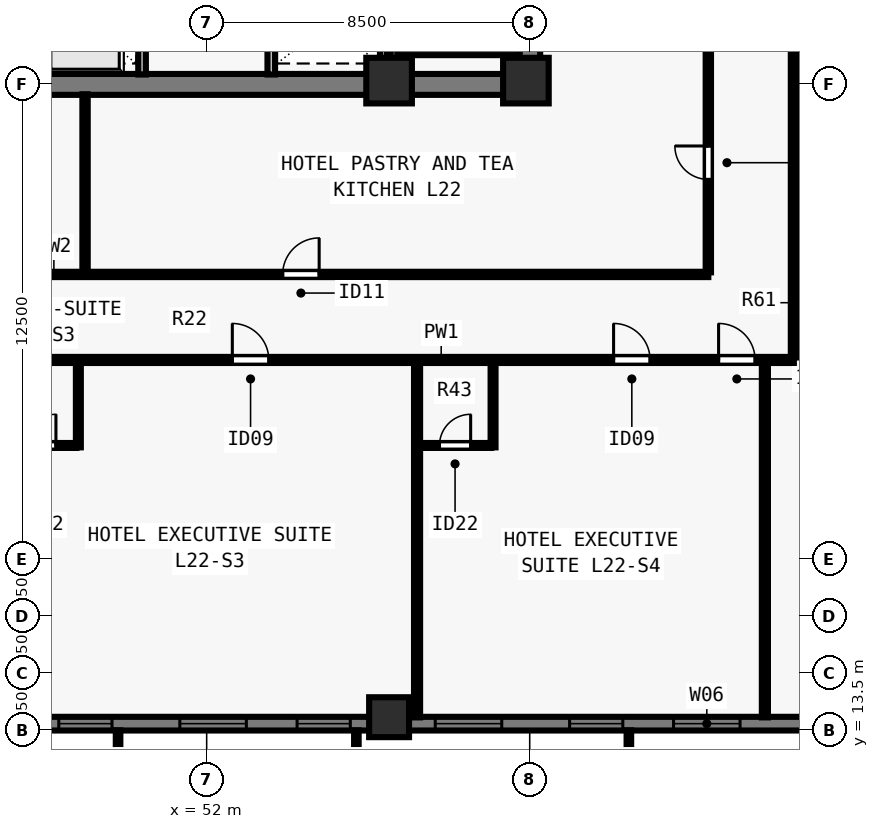
"""IFC4 building model, lengths in metres.
Left out: names, types, materials, properties, quantities, classifications, styles, units other than length and angle.
Written with IfcOpenShell. Run it as: python <this file> out.ifc"""

import sys

from ifc_helpers import new_model, si_unit, direction, frame, frame_2d, origin, origin_2d, place, context, subcontext, project, spatial, rectangle, extrude, element, fill, save


model = new_model("IFC4")
c1 = context("Model", 3, precision=1e-05, world=origin(), true_north=direction((0.0, 1.0)))
c2 = subcontext(c1, "Body", "Model", "MODEL_VIEW")
j1 = project(units=[si_unit("LENGTHUNIT", "METRE"), si_unit("PLANEANGLEUNIT", "RADIAN")], contexts=[c1])
p1 = place(None, origin())
s1 = spatial("IfcSite", under=j1, at=p1, CompositionType="ELEMENT")
p2 = place(p1, origin())
s2 = spatial("IfcBuilding", under=s1, at=p2, CompositionType="ELEMENT")
p3 = place(p2, frame((0.0, 0.0, 83.0)))
s3 = spatial("IfcBuildingStorey", under=s2, at=p3, CompositionType="ELEMENT", Elevation=83.0)
for number, where, z_axis, x_axis in (
    (1, (56.8, 30.6, 0.0), (0.0, 0.0, 1.0), (1.0, 0.0, 0.0)),
    (2, (60.4, 30.6, 0.0), (0.0, 0.0, 1.0), (1.0, 0.0, 0.0)),
):
    element("IfcColumn", number, at=place(p3, frame(where, z_axis=z_axis, x_axis=x_axis)), inside=s3, PredefinedType="COLUMN", context=c2, shape_type="SweptSolid", body=[
        extrude(rectangle(XDim=1.2, YDim=1.2, at=origin_2d()), origin(), (0.0, 0.0, 1.0), 3.5),
    ])
p4 = place(p3, frame((56.8, 13.85, 0.0), z_axis=(0.0, 0.0, 1.0), x_axis=(1.0, 0.0, 0.0)))
e3 = element("IfcColumn", 3, at=p4, inside=s3, PredefinedType="COLUMN", context=c2, shape_type="SweptSolid", body=[
    extrude(rectangle(XDim=1.05, YDim=1.05, at=origin_2d()), origin(), (0.0, 0.0, 1.0), 3.5),
])
p5 = place(p3, frame((74.5, 13.68, 0.0), z_axis=(0.0, 0.0, 1.0), x_axis=(-1.0, 0.0, 0.0)))
e4 = element("IfcWall", 4, at=p5, inside=s3, PredefinedType="SOLIDWALL", context=c2, shape_type="SweptSolid", body=[
    extrude(rectangle(XDim=44.662, YDim=0.36, at=frame_2d((22.331, 0.0))), origin(), (0.0, 0.0, 1.0), 3.28),
])
p6 = place(p5, frame((4.83, 0.0, 0.8)))
e5 = element("IfcOpeningElement", 5, at=p6, cuts=e4, PredefinedType="OPENING", context=c2, shape_type="SweptSolid", body=[
    extrude(rectangle(XDim=1.4, YDim=1.544, at=frame_2d((0.7, 0.772))), frame((0.0, 0.19, 0.0), z_axis=(0.0, -1.0, 0.0), x_axis=(1.0, 0.0, 0.0)), (0.0, 0.0, 1.0), 0.38),
])
p7 = place(p5, frame((8.465, 0.0, 0.8)))
e6 = element("IfcOpeningElement", 6, at=p7, cuts=e4, PredefinedType="OPENING", context=c2, shape_type="SweptSolid", body=[
    extrude(rectangle(XDim=1.75, YDim=1.544, at=frame_2d((0.875, 0.772))), frame((0.0, 0.19, 0.0), z_axis=(0.0, -1.0, 0.0), x_axis=(1.0, 0.0, 0.0)), (0.0, 0.0, 1.0), 0.38),
])
p8 = place(p5, frame((11.551, 0.0, 0.8)))
e7 = element("IfcOpeningElement", 7, at=p8, cuts=e4, PredefinedType="OPENING", context=c2, shape_type="SweptSolid", body=[
    extrude(rectangle(XDim=1.4, YDim=1.544, at=frame_2d((0.7, 0.772))), frame((0.0, 0.19, 0.0), z_axis=(0.0, -1.0, 0.0), x_axis=(1.0, 0.0, 0.0)), (0.0, 0.0, 1.0), 0.38),
])
p9 = place(p5, frame((14.736, 0.0, 0.8)))
e8 = element("IfcOpeningElement", 8, at=p9, cuts=e4, PredefinedType="OPENING", context=c2, shape_type="SweptSolid", body=[
    extrude(rectangle(XDim=1.75, YDim=1.544, at=frame_2d((0.875, 0.772))), frame((0.0, 0.19, 0.0), z_axis=(0.0, -1.0, 0.0), x_axis=(1.0, 0.0, 0.0)), (0.0, 0.0, 1.0), 0.38),
])
p10 = place(p5, frame((18.721, 0.0, 0.8)))
e9 = element("IfcOpeningElement", 9, at=p10, cuts=e4, PredefinedType="OPENING", context=c2, shape_type="SweptSolid", body=[
    extrude(rectangle(XDim=1.4, YDim=1.544, at=frame_2d((0.7, 0.772))), frame((0.0, 0.19, 0.0), z_axis=(0.0, -1.0, 0.0), x_axis=(1.0, 0.0, 0.0)), (0.0, 0.0, 1.0), 0.38),
])
p11 = place(p5, frame((21.456, 0.0, 0.8)))
e10 = element("IfcOpeningElement", 10, at=p11, cuts=e4, PredefinedType="OPENING", context=c2, shape_type="SweptSolid", body=[
    extrude(rectangle(XDim=1.75, YDim=1.544, at=frame_2d((0.875, 0.772))), frame((0.0, 0.19, 0.0), z_axis=(0.0, -1.0, 0.0), x_axis=(1.0, 0.0, 0.0)), (0.0, 0.0, 1.0), 0.38),
])
p12 = place(p5, frame((24.991, 0.0, 0.8)))
e11 = element("IfcOpeningElement", 11, at=p12, cuts=e4, PredefinedType="OPENING", context=c2, shape_type="SweptSolid", body=[
    extrude(rectangle(XDim=1.4, YDim=1.544, at=frame_2d((0.7, 0.772))), frame((0.0, 0.19, 0.0), z_axis=(0.0, -1.0, 0.0), x_axis=(1.0, 0.0, 0.0)), (0.0, 0.0, 1.0), 0.38),
])
p13 = place(p5, frame((28.177, 0.0, 0.8)))
e12 = element("IfcOpeningElement", 12, at=p13, cuts=e4, PredefinedType="OPENING", context=c2, shape_type="SweptSolid", body=[
    extrude(rectangle(XDim=1.75, YDim=1.544, at=frame_2d((0.875, 0.772))), frame((0.0, 0.19, 0.0), z_axis=(0.0, -1.0, 0.0), x_axis=(1.0, 0.0, 0.0)), (0.0, 0.0, 1.0), 0.38),
])
p14 = place(p5, frame((31.711, 0.0, 0.8)))
e13 = element("IfcOpeningElement", 13, at=p14, cuts=e4, PredefinedType="OPENING", context=c2, shape_type="SweptSolid", body=[
    extrude(rectangle(XDim=1.4, YDim=1.544, at=frame_2d((0.7, 0.772))), frame((0.0, 0.19, 0.0), z_axis=(0.0, -1.0, 0.0), x_axis=(1.0, 0.0, 0.0)), (0.0, 0.0, 1.0), 0.38),
])
p15 = place(p5, frame((34.897, 0.0, 0.8)))
e14 = element("IfcOpeningElement", 14, at=p15, cuts=e4, PredefinedType="OPENING", context=c2, shape_type="SweptSolid", body=[
    extrude(rectangle(XDim=1.75, YDim=1.544, at=frame_2d((0.875, 0.772))), frame((0.0, 0.19, 0.0), z_axis=(0.0, -1.0, 0.0), x_axis=(1.0, 0.0, 0.0)), (0.0, 0.0, 1.0), 0.38),
])
p16 = place(p5, frame((38.432, 0.0, 0.8)))
e15 = element("IfcOpeningElement", 15, at=p16, cuts=e4, PredefinedType="OPENING", context=c2, shape_type="SweptSolid", body=[
    extrude(rectangle(XDim=1.4, YDim=1.544, at=frame_2d((0.7, 0.772))), frame((0.0, 0.19, 0.0), z_axis=(0.0, -1.0, 0.0), x_axis=(1.0, 0.0, 0.0)), (0.0, 0.0, 1.0), 0.38),
])
p17 = place(p3, frame((43.225, 30.5, 0.0), z_axis=(0.0, 0.0, 1.0), x_axis=(1.0, 0.0, 0.0)))
e16 = element("IfcWall", 16, at=p17, inside=s3, PredefinedType="SHEAR", context=c2, shape_type="SweptSolid", body=[
    extrude(rectangle(XDim=17.55, YDim=0.55, at=frame_2d((8.775, 0.0))), origin(), (0.0, 0.0, 1.0), 3.28),
])
p18 = place(p3, frame((60.5, 30.765, 0.0), z_axis=(0.0, 0.0, 1.0), x_axis=(0.0, 1.0, 0.0)))
e17 = element("IfcWall", 17, at=p18, inside=s3, PredefinedType="SHEAR", context=c2, shape_type="SweptSolid", body=[
    extrude(rectangle(XDim=7.985, YDim=0.55, at=frame_2d((3.993, 0.0))), origin(), (0.0, 0.0, 1.0), 3.28),
])
p19 = place(p3, frame((50.3, 30.76, 0.0), z_axis=(0.0, 0.0, 1.0), x_axis=(0.0, 1.0, 0.0)))
e18 = element("IfcWall", 18, at=p19, inside=s3, PredefinedType="SOLIDWALL", context=c2, shape_type="SweptSolid", body=[
    extrude(rectangle(XDim=7.855, YDim=0.2, at=frame_2d((3.927, 0.0))), origin(), (0.0, 0.0, 1.0), 3.28),
])
p20 = place(p19, frame((0.79, 0.0, 0.0)))
e19 = element("IfcOpeningElement", 19, at=p20, cuts=e18, PredefinedType="OPENING", context=c2, shape_type="SweptSolid", body=[
    extrude(rectangle(XDim=1.1, YDim=2.2, at=frame_2d((0.55, 1.1))), frame((0.0, 0.11, 0.0), z_axis=(0.0, -1.0, 0.0), x_axis=(1.0, 0.0, 0.0)), (0.0, 0.0, 1.0), 0.22),
])
p21 = place(p19, frame((3.49, 0.0, 0.0)))
e20 = element("IfcOpeningElement", 20, at=p21, cuts=e18, PredefinedType="OPENING", context=c2, shape_type="SweptSolid", body=[
    extrude(rectangle(XDim=1.1, YDim=2.2, at=frame_2d((0.55, 1.1))), frame((0.0, 0.11, 0.0), z_axis=(0.0, -1.0, 0.0), x_axis=(1.0, 0.0, 0.0)), (0.0, 0.0, 1.0), 0.22),
])
p22 = place(p19, frame((6.19, 0.0, 0.0)))
e21 = element("IfcOpeningElement", 21, at=p22, cuts=e18, PredefinedType="OPENING", context=c2, shape_type="SweptSolid", body=[
    extrude(rectangle(XDim=1.1, YDim=2.2, at=frame_2d((0.55, 1.1))), frame((0.0, 0.11, 0.0), z_axis=(0.0, -1.0, 0.0), x_axis=(1.0, 0.0, 0.0)), (0.0, 0.0, 1.0), 0.22),
])
p23 = place(p3, frame((53.7, 30.76, 0.0), z_axis=(0.0, 0.0, 1.0), x_axis=(0.0, 1.0, 0.0)))
e22 = element("IfcWall", 22, at=p23, inside=s3, PredefinedType="SOLIDWALL", context=c2, shape_type="SweptSolid", body=[
    extrude(rectangle(XDim=7.855, YDim=0.2, at=frame_2d((3.927, 0.0))), origin(), (0.0, 0.0, 1.0), 3.28),
])
p24 = place(p3, frame((56.65, 30.76, 0.0), z_axis=(0.0, 0.0, 1.0), x_axis=(0.0, 1.0, 0.0)))
e23 = element("IfcWall", 23, at=p24, inside=s3, PredefinedType="SOLIDWALL", context=c2, shape_type="SweptSolid", body=[
    extrude(rectangle(XDim=7.855, YDim=0.18, at=frame_2d((3.927, 0.0))), origin(), (0.0, 0.0, 1.0), 3.28),
])
p25 = place(p3, frame((36.55, 23.25, 0.0), z_axis=(0.0, 0.0, 1.0), x_axis=(1.0, 0.0, 0.0)))
e24 = element("IfcWall", 24, at=p25, inside=s3, PredefinedType="PARTITIONING", context=c2, shape_type="SweptSolid", body=[
    extrude(rectangle(XDim=30.9, YDim=0.16, at=frame_2d((15.45, 0.0))), origin(), (0.0, 0.0, 1.0), 3.28),
])
p26 = place(p25, frame((1.13, 0.0, 0.0)))
e25 = element("IfcOpeningElement", 25, at=p26, cuts=e24, PredefinedType="OPENING", context=c2, shape_type="SweptSolid", body=[
    extrude(rectangle(XDim=0.96, YDim=2.15, at=frame_2d((0.48, 1.075))), frame((0.0, 0.09, 0.0), z_axis=(0.0, -1.0, 0.0), x_axis=(1.0, 0.0, 0.0)), (0.0, 0.0, 1.0), 0.18),
])
p27 = place(p25, frame((6.093, 0.0, 0.0)))
e26 = element("IfcOpeningElement", 26, at=p27, cuts=e24, PredefinedType="OPENING", context=c2, shape_type="SweptSolid", body=[
    extrude(rectangle(XDim=0.96, YDim=2.15, at=frame_2d((0.48, 1.075))), frame((0.0, 0.09, 0.0), z_axis=(0.0, -1.0, 0.0), x_axis=(1.0, 0.0, 0.0)), (0.0, 0.0, 1.0), 0.18),
])
p28 = place(p25, frame((16.125, 0.0, 0.0)))
e27 = element("IfcOpeningElement", 27, at=p28, cuts=e24, PredefinedType="OPENING", context=c2, shape_type="SweptSolid", body=[
    extrude(rectangle(XDim=0.96, YDim=2.15, at=frame_2d((0.48, 1.075))), frame((0.0, 0.09, 0.0), z_axis=(0.0, -1.0, 0.0), x_axis=(1.0, 0.0, 0.0)), (0.0, 0.0, 1.0), 0.18),
])
p29 = place(p25, frame((26.157, 0.0, 0.0)))
e28 = element("IfcOpeningElement", 28, at=p29, cuts=e24, PredefinedType="OPENING", context=c2, shape_type="SweptSolid", body=[
    extrude(rectangle(XDim=0.96, YDim=2.15, at=frame_2d((0.48, 1.075))), frame((0.0, 0.09, 0.0), z_axis=(0.0, -1.0, 0.0), x_axis=(1.0, 0.0, 0.0)), (0.0, 0.0, 1.0), 0.18),
])
p30 = place(p25, frame((28.92, 0.0, 0.0)))
e29 = element("IfcOpeningElement", 29, at=p30, cuts=e24, PredefinedType="OPENING", context=c2, shape_type="SweptSolid", body=[
    extrude(rectangle(XDim=0.96, YDim=2.15, at=frame_2d((0.48, 1.075))), frame((0.0, 0.09, 0.0), z_axis=(0.0, -1.0, 0.0), x_axis=(1.0, 0.0, 0.0)), (0.0, 0.0, 1.0), 0.18),
])
p31 = place(p3, frame((67.45, 23.315, 0.0), z_axis=(0.0, 0.0, 1.0), x_axis=(0.0, 1.0, 0.0)))
e30 = element("IfcWall", 30, at=p31, inside=s3, PredefinedType="PARTITIONING", context=c2, shape_type="SweptSolid", body=[
    extrude(rectangle(XDim=31.37, YDim=0.16, at=frame_2d((15.685, 0.0))), origin(), (0.0, 0.0, 1.0), 3.28),
])
p32 = place(p31, frame((8.474, 0.0, 0.0)))
e31 = element("IfcOpeningElement", 31, at=p32, cuts=e30, PredefinedType="OPENING", context=c2, shape_type="SweptSolid", body=[
    extrude(rectangle(XDim=0.96, YDim=2.15, at=frame_2d((0.48, 1.075))), frame((0.0, 0.09, 0.0), z_axis=(0.0, -1.0, 0.0), x_axis=(1.0, 0.0, 0.0)), (0.0, 0.0, 1.0), 0.18),
])
p33 = place(p31, frame((23.974, 0.0, 0.0)))
e32 = element("IfcOpeningElement", 32, at=p33, cuts=e30, PredefinedType="OPENING", context=c2, shape_type="SweptSolid", body=[
    extrude(rectangle(XDim=0.96, YDim=2.15, at=frame_2d((0.48, 1.075))), frame((0.0, 0.09, 0.0), z_axis=(0.0, -1.0, 0.0), x_axis=(1.0, 0.0, 0.0)), (0.0, 0.0, 1.0), 0.18),
])
p34 = place(p3, frame((38.8, 25.5, 0.0), z_axis=(0.0, 0.0, 1.0), x_axis=(1.0, 0.0, 0.0)))
e33 = element("IfcWall", 33, at=p34, inside=s3, PredefinedType="PARTITIONING", context=c2, shape_type="SweptSolid", body=[
    extrude(rectangle(XDim=26.4, YDim=0.14, at=frame_2d((13.2, 0.0))), origin(), (0.0, 0.0, 1.0), 3.28),
])
p35 = place(p34, frame((2.2, 0.0, 0.0)))
e34 = element("IfcOpeningElement", 34, at=p35, cuts=e33, PredefinedType="OPENING", context=c2, shape_type="SweptSolid", body=[
    extrude(rectangle(XDim=0.96, YDim=2.12, at=frame_2d((0.48, 1.06))), frame((0.0, 0.08, 0.0), z_axis=(0.0, -1.0, 0.0), x_axis=(1.0, 0.0, 0.0)), (0.0, 0.0, 1.0), 0.16),
])
p36 = place(p34, frame((15.2, 0.0, 0.0)))
e35 = element("IfcOpeningElement", 35, at=p36, cuts=e33, PredefinedType="OPENING", context=c2, shape_type="SweptSolid", body=[
    extrude(rectangle(XDim=0.96, YDim=2.12, at=frame_2d((0.48, 1.06))), frame((0.0, 0.08, 0.0), z_axis=(0.0, -1.0, 0.0), x_axis=(1.0, 0.0, 0.0)), (0.0, 0.0, 1.0), 0.16),
])
p37 = place(p3, frame((65.2, 25.555, 0.0), z_axis=(0.0, 0.0, 1.0), x_axis=(0.0, 1.0, 0.0)))
e36 = element("IfcWall", 36, at=p37, inside=s3, PredefinedType="PARTITIONING", context=c2, shape_type="SweptSolid", body=[
    extrude(rectangle(XDim=13.195, YDim=0.14, at=frame_2d((6.598, 0.0))), origin(), (0.0, 0.0, 1.0), 3.28),
])
p38 = place(p37, frame((2.445, 0.0, 0.0)))
e37 = element("IfcOpeningElement", 37, at=p38, cuts=e36, PredefinedType="OPENING", context=c2, shape_type="SweptSolid", body=[
    extrude(rectangle(XDim=0.88, YDim=2.1, at=frame_2d((0.44, 1.05))), frame((0.0, 0.08, 0.0), z_axis=(0.0, -1.0, 0.0), x_axis=(1.0, 0.0, 0.0)), (0.0, 0.0, 1.0), 0.16),
])
p39 = place(p3, frame((48.8, 25.555, 0.0), z_axis=(0.0, 0.0, 1.0), x_axis=(0.0, 1.0, 0.0)))
e38 = element("IfcWall", 38, at=p39, inside=s3, PredefinedType="PARTITIONING", context=c2, shape_type="SweptSolid", body=[
    extrude(rectangle(XDim=4.685, YDim=0.14, at=frame_2d((2.343, 0.0))), origin(), (0.0, 0.0, 1.0), 3.28),
])
p40 = place(p3, frame((48.624, 20.95, 0.0), z_axis=(0.0, 0.0, 1.0), x_axis=(0.0, 1.0, 0.0)))
e39 = element("IfcWall", 39, at=p40, inside=s3, PredefinedType="PLUMBINGWALL", context=c2, shape_type="SweptSolid", body=[
    extrude(rectangle(XDim=2.235, YDim=0.13, at=frame_2d((1.118, 0.0))), origin(), (0.0, 0.0, 1.0), 3.28),
])
p41 = place(p3, frame((46.689, 21.0, 0.0), z_axis=(0.0, 0.0, 1.0), x_axis=(1.0, 0.0, 0.0)))
e40 = element("IfcWall", 40, at=p41, inside=s3, PredefinedType="PLUMBINGWALL", context=c2, shape_type="SweptSolid", body=[
    extrude(rectangle(XDim=1.885, YDim=0.13, at=frame_2d((0.942, 0.0))), origin(), (0.0, 0.0, 1.0), 3.28),
])
p42 = place(p41, frame((0.525, 0.0, 0.0)))
e41 = element("IfcOpeningElement", 41, at=p42, cuts=e40, PredefinedType="OPENING", context=c2, shape_type="SweptSolid", body=[
    extrude(rectangle(XDim=0.82, YDim=2.1, at=frame_2d((0.41, 1.05))), frame((0.0, 0.075, 0.0), z_axis=(0.0, -1.0, 0.0), x_axis=(1.0, 0.0, 0.0)), (0.0, 0.0, 1.0), 0.15),
])
p43 = place(p3, frame((57.536, 13.845, 0.0), z_axis=(0.0, 0.0, 1.0), x_axis=(0.0, 1.0, 0.0)))
e42 = element("IfcWall", 42, at=p43, inside=s3, PredefinedType="PARTITIONING", context=c2, shape_type="SweptSolid", body=[
    extrude(rectangle(XDim=9.34, YDim=0.16, at=frame_2d((4.67, 0.0))), origin(), (0.0, 0.0, 1.0), 3.28),
])
p44 = place(p3, frame((59.536, 20.95, 0.0), z_axis=(0.0, 0.0, 1.0), x_axis=(0.0, 1.0, 0.0)))
e43 = element("IfcWall", 43, at=p44, inside=s3, PredefinedType="PLUMBINGWALL", context=c2, shape_type="SweptSolid", body=[
    extrude(rectangle(XDim=2.235, YDim=0.13, at=frame_2d((1.118, 0.0))), origin(), (0.0, 0.0, 1.0), 3.28),
])
p45 = place(p3, frame((57.601, 21.0, 0.0), z_axis=(0.0, 0.0, 1.0), x_axis=(1.0, 0.0, 0.0)))
e44 = element("IfcWall", 44, at=p45, inside=s3, PredefinedType="PLUMBINGWALL", context=c2, shape_type="SweptSolid", body=[
    extrude(rectangle(XDim=1.885, YDim=0.13, at=frame_2d((0.942, 0.0))), origin(), (0.0, 0.0, 1.0), 3.28),
])
p46 = place(p45, frame((0.525, 0.0, 0.0)))
e45 = element("IfcOpeningElement", 45, at=p46, cuts=e44, PredefinedType="OPENING", context=c2, shape_type="SweptSolid", body=[
    extrude(rectangle(XDim=0.82, YDim=2.1, at=frame_2d((0.41, 1.05))), frame((0.0, 0.075, 0.0), z_axis=(0.0, -1.0, 0.0), x_axis=(1.0, 0.0, 0.0)), (0.0, 0.0, 1.0), 0.15),
])
p47 = place(p3, frame((66.688, 13.845, 0.0), z_axis=(0.0, 0.0, 1.0), x_axis=(0.0, 1.0, 0.0)))
e46 = element("IfcWall", 46, at=p47, inside=s3, PredefinedType="PARTITIONING", context=c2, shape_type="SweptSolid", body=[
    extrude(rectangle(XDim=9.34, YDim=0.16, at=frame_2d((4.67, 0.0))), origin(), (0.0, 0.0, 1.0), 2.439),
])
p48 = place(p3, frame((67.515, 23.7, 0.0), z_axis=(0.0, 0.0, 1.0), x_axis=(1.0, 0.0, 0.0)))
e47 = element("IfcWall", 47, at=p48, inside=s3, PredefinedType="PLUMBINGWALL", context=c2, shape_type="SweptSolid", body=[
    extrude(rectangle(XDim=2.235, YDim=0.13, at=frame_2d((1.118, 0.0))), origin(), (0.0, 0.0, 1.0), 2.849),
])
p49 = place(p3, frame((67.515, 25.7, 0.0), z_axis=(0.0, 0.0, 1.0), x_axis=(1.0, 0.0, 0.0)))
e48 = element("IfcWall", 48, at=p49, inside=s3, PredefinedType="PLUMBINGWALL", context=c2, shape_type="SweptSolid", body=[
    extrude(rectangle(XDim=2.235, YDim=0.13, at=frame_2d((1.118, 0.0))), origin(), (0.0, 0.0, 1.0), 3.28),
])
p50 = place(p3, frame((57.005, 31.36, 0.0), z_axis=(0.0, 0.0, 1.0), x_axis=(1.0, 0.0, 0.0)))
e49 = element("IfcWall", 49, at=p50, inside=s3, PredefinedType="SOLIDWALL", context=c2, shape_type="SweptSolid", body=[
    extrude(rectangle(XDim=3.23, YDim=0.18, at=frame_2d((1.615, 0.0))), origin(), (0.0, 0.0, 1.0), 3.28),
])
p51 = place(p3, frame((56.93, 38.78, 0.0), z_axis=(0.0, 0.0, 1.0), x_axis=(0.0, -1.0, 0.0)))
e50 = element("IfcWall", 50, at=p51, inside=s3, PredefinedType="SOLIDWALL", context=c2, shape_type="SweptSolid", body=[
    extrude(rectangle(XDim=8.017, YDim=0.18, at=frame_2d((4.009, 0.0))), origin(), (0.0, 0.0, 1.0), 3.28),
])
p52 = place(p7, origin())
e51 = element("IfcWindow", 51, at=p52, inside=s3, PartitioningType="SINGLE_PANEL", PredefinedType="WINDOW", context=c2, shape_type="SweptSolid", body=[
    extrude(rectangle(XDim=1.75, YDim=1.544, at=frame_2d((0.875, 0.772))), frame((0.0, -0.05, 0.0), z_axis=(0.0, -1.0, 0.0), x_axis=(1.0, 0.0, 0.0)), (0.0, 0.0, 1.0), 0.06),
])
fill(e6, e51)
p53 = place(p8, origin())
e52 = element("IfcWindow", 52, at=p53, inside=s3, PartitioningType="SINGLE_PANEL", PredefinedType="WINDOW", context=c2, shape_type="SweptSolid", body=[
    extrude(rectangle(XDim=1.4, YDim=1.544, at=frame_2d((0.7, 0.772))), frame((0.0, -0.05, 0.0), z_axis=(0.0, -1.0, 0.0), x_axis=(1.0, 0.0, 0.0)), (0.0, 0.0, 1.0), 0.06),
])
fill(e7, e52)
p54 = place(p9, origin())
e53 = element("IfcWindow", 53, at=p54, inside=s3, PartitioningType="SINGLE_PANEL", PredefinedType="WINDOW", context=c2, shape_type="SweptSolid", body=[
    extrude(rectangle(XDim=1.75, YDim=1.544, at=frame_2d((0.875, 0.772))), frame((0.0, -0.05, 0.0), z_axis=(0.0, -1.0, 0.0), x_axis=(1.0, 0.0, 0.0)), (0.0, 0.0, 1.0), 0.06),
])
fill(e8, e53)
p55 = place(p10, origin())
e54 = element("IfcWindow", 54, at=p55, inside=s3, PartitioningType="SINGLE_PANEL", PredefinedType="WINDOW", context=c2, shape_type="SweptSolid", body=[
    extrude(rectangle(XDim=1.4, YDim=1.544, at=frame_2d((0.7, 0.772))), frame((0.0, -0.05, 0.0), z_axis=(0.0, -1.0, 0.0), x_axis=(1.0, 0.0, 0.0)), (0.0, 0.0, 1.0), 0.06),
])
fill(e9, e54)
p56 = place(p11, origin())
e55 = element("IfcWindow", 55, at=p56, inside=s3, PartitioningType="SINGLE_PANEL", PredefinedType="WINDOW", context=c2, shape_type="SweptSolid", body=[
    extrude(rectangle(XDim=1.75, YDim=1.544, at=frame_2d((0.875, 0.772))), frame((0.0, -0.05, 0.0), z_axis=(0.0, -1.0, 0.0), x_axis=(1.0, 0.0, 0.0)), (0.0, 0.0, 1.0), 0.06),
])
fill(e10, e55)
p57 = place(p12, origin())
e56 = element("IfcWindow", 56, at=p57, inside=s3, PartitioningType="SINGLE_PANEL", PredefinedType="WINDOW", context=c2, shape_type="SweptSolid", body=[
    extrude(rectangle(XDim=1.4, YDim=1.544, at=frame_2d((0.7, 0.772))), frame((0.0, -0.05, 0.0), z_axis=(0.0, -1.0, 0.0), x_axis=(1.0, 0.0, 0.0)), (0.0, 0.0, 1.0), 0.06),
])
fill(e11, e56)
p58 = place(p36, origin())
e57 = element("IfcDoor", 57, at=p58, inside=s3, OperationType="SINGLE_SWING_RIGHT", PredefinedType="DOOR", context=c2, shape_type="SweptSolid", body=[
    extrude(rectangle(XDim=0.96, YDim=2.12, at=frame_2d((0.48, 1.06))), frame((0.0, 0.025, 0.0), z_axis=(0.0, -1.0, 0.0), x_axis=(1.0, 0.0, 0.0)), (0.0, 0.0, 1.0), 0.05),
])
fill(e35, e57)
p59 = place(p38, origin())
e58 = element("IfcDoor", 58, at=p59, inside=s3, OperationType="SINGLE_SWING_RIGHT", PredefinedType="DOOR", context=c2, shape_type="SweptSolid", body=[
    extrude(rectangle(XDim=0.88, YDim=2.1, at=frame_2d((0.44, 1.05))), frame((0.0, 0.025, 0.0), z_axis=(0.0, -1.0, 0.0), x_axis=(1.0, 0.0, 0.0)), (0.0, 0.0, 1.0), 0.05),
])
fill(e37, e58)
p60 = place(p42, origin())
e59 = element("IfcDoor", 59, at=p60, inside=s3, OperationType="SINGLE_SWING_RIGHT", PredefinedType="DOOR", context=c2, shape_type="SweptSolid", body=[
    extrude(rectangle(XDim=0.82, YDim=2.1, at=frame_2d((0.41, 1.05))), frame((0.0, 0.025, 0.0), z_axis=(0.0, -1.0, 0.0), x_axis=(1.0, 0.0, 0.0)), (0.0, 0.0, 1.0), 0.05),
])
fill(e41, e59)
p61 = place(p28, origin())
e60 = element("IfcDoor", 60, at=p61, inside=s3, OperationType="SINGLE_SWING_LEFT", PredefinedType="DOOR", context=c2, shape_type="SweptSolid", body=[
    extrude(rectangle(XDim=0.96, YDim=2.15, at=frame_2d((0.48, 1.075))), frame((0.0, 0.025, 0.0), z_axis=(0.0, -1.0, 0.0), x_axis=(1.0, 0.0, 0.0)), (0.0, 0.0, 1.0), 0.05),
])
fill(e27, e60)
p62 = place(p46, origin())
e61 = element("IfcDoor", 61, at=p62, inside=s3, OperationType="SINGLE_SWING_RIGHT", PredefinedType="DOOR", context=c2, shape_type="SweptSolid", body=[
    extrude(rectangle(XDim=0.82, YDim=2.1, at=frame_2d((0.41, 1.05))), frame((0.0, 0.025, 0.0), z_axis=(0.0, -1.0, 0.0), x_axis=(1.0, 0.0, 0.0)), (0.0, 0.0, 1.0), 0.05),
])
fill(e45, e61)
p63 = place(p29, origin())
e62 = element("IfcDoor", 62, at=p63, inside=s3, OperationType="SINGLE_SWING_LEFT", PredefinedType="DOOR", context=c2, shape_type="SweptSolid", body=[
    extrude(rectangle(XDim=0.96, YDim=2.15, at=frame_2d((0.48, 1.075))), frame((0.0, 0.025, 0.0), z_axis=(0.0, -1.0, 0.0), x_axis=(1.0, 0.0, 0.0)), (0.0, 0.0, 1.0), 0.05),
])
fill(e28, e62)
p64 = place(p30, origin())
e63 = element("IfcDoor", 63, at=p64, inside=s3, OperationType="SINGLE_SWING_LEFT", PredefinedType="DOOR", context=c2, shape_type="SweptSolid", body=[
    extrude(rectangle(XDim=0.96, YDim=2.15, at=frame_2d((0.48, 1.075))), frame((0.0, 0.025, 0.0), z_axis=(0.0, -1.0, 0.0), x_axis=(1.0, 0.0, 0.0)), (0.0, 0.0, 1.0), 0.05),
])
fill(e29, e63)
save(model, sys.argv[1])
